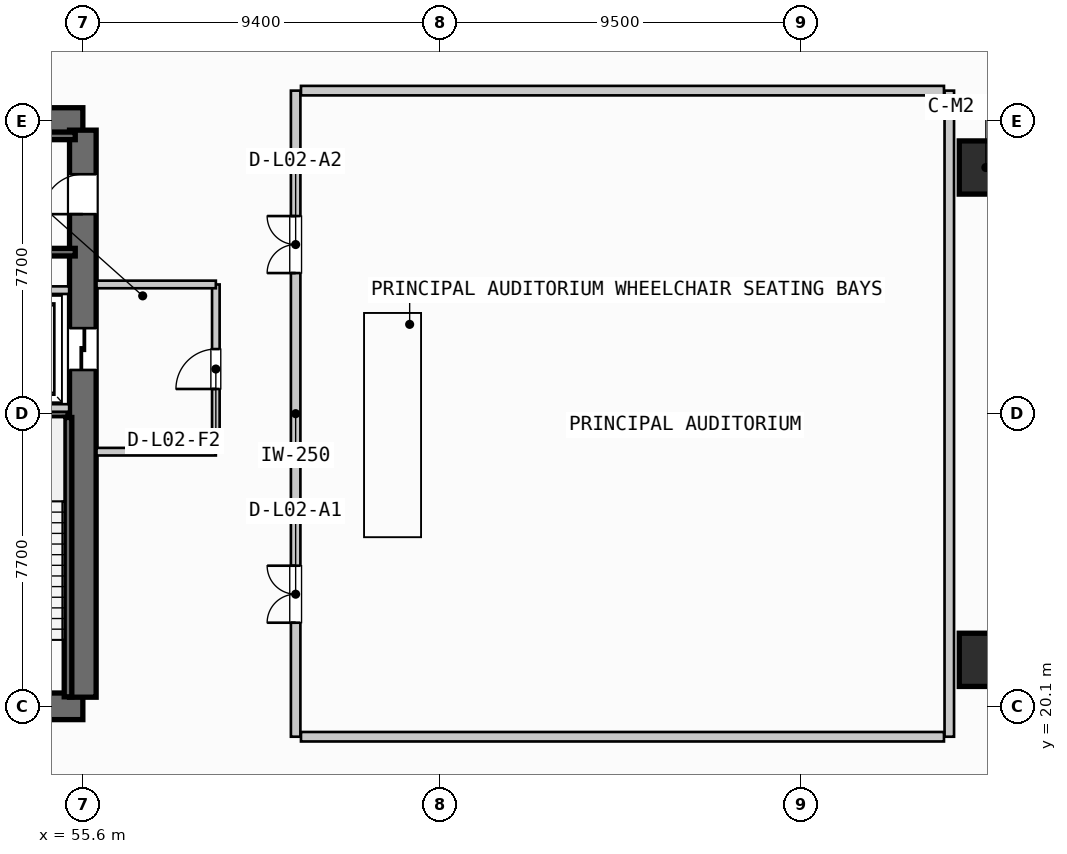
"""IFC4 building model, lengths in metres.
Left out: names, types, materials, properties, quantities, classifications, styles, units other than length and angle.
Written with IfcOpenShell. Run it as: python <this file> out.ifc"""

import sys

from ifc_helpers import new_model, si_unit, direction, frame, frame_2d, origin, origin_2d, place, context, subcontext, project, spatial, rectangle, hollow_rectangle, extrude, source, transform, mapped, element, fill, save


model = new_model("IFC4")
c1 = context("Model", 3, precision=1e-05, world=origin(), true_north=direction((0.0, 1.0)))
c2 = subcontext(c1, "Body", "Model", "MODEL_VIEW")
j1 = project(units=[si_unit("LENGTHUNIT", "METRE"), si_unit("PLANEANGLEUNIT", "RADIAN")], contexts=[c1])
p1 = place(None, origin())
s1 = spatial("IfcSite", under=j1, at=p1, CompositionType="ELEMENT")
p2 = place(p1, origin())
s2 = spatial("IfcBuilding", under=s1, at=p2, CompositionType="ELEMENT")
p3 = place(p2, frame((0.0, 0.0, 10.0)))
s3 = spatial("IfcBuildingStorey", under=s2, at=p3, CompositionType="ELEMENT", Elevation=10.0)
p4 = place(p3, frame((38.0, 20.1, 0.0), z_axis=(0.0, 0.0, 1.0), x_axis=(1.0, 0.0, 0.0)))
e1 = element("IfcWall", 1, at=p4, inside=s3, PredefinedType="SHEAR", context=c2, shape_type="SweptSolid", body=[
    extrude(rectangle(XDim=17.6, YDim=0.7, at=frame_2d((8.8, 0.0))), origin(), (0.0, 0.0, 1.0), 4.53),
])
p5 = place(p4, frame((1.4, 0.0, 0.0)))
e2 = element("IfcOpeningElement", 2, at=p5, cuts=e1, PredefinedType="OPENING", context=c2, shape_type="SweptSolid", body=[
    extrude(rectangle(XDim=1.05, YDim=2.15, at=frame_2d((0.525, 1.075))), frame((0.0, 0.36, 0.0), z_axis=(0.0, -1.0, 0.0), x_axis=(1.0, 0.0, 0.0)), (0.0, 0.0, 1.0), 0.72),
])
p6 = place(p4, frame((15.15, 0.0, 0.0)))
e3 = element("IfcOpeningElement", 3, at=p6, cuts=e1, PredefinedType="OPENING", context=c2, shape_type="SweptSolid", body=[
    extrude(rectangle(XDim=1.05, YDim=2.15, at=frame_2d((0.525, 1.075))), frame((0.0, 0.36, 0.0), z_axis=(0.0, -1.0, 0.0), x_axis=(1.0, 0.0, 0.0)), (0.0, 0.0, 1.0), 0.72),
])
p7 = place(p3, frame((55.6, 35.5, 0.0), z_axis=(0.0, 0.0, 1.0), x_axis=(-1.0, 0.0, 0.0)))
e4 = element("IfcWall", 4, at=p7, inside=s3, PredefinedType="SHEAR", context=c2, shape_type="SweptSolid", body=[
    extrude(rectangle(XDim=17.6, YDim=0.7, at=frame_2d((8.8, 0.0))), origin(), (0.0, 0.0, 1.0), 4.53),
])
p8 = place(p7, frame((8.05, 0.0, 0.0)))
e5 = element("IfcOpeningElement", 5, at=p8, cuts=e4, PredefinedType="OPENING", context=c2, shape_type="SweptSolid", body=[
    extrude(rectangle(XDim=1.5, YDim=2.2, at=frame_2d((0.75, 1.1))), frame((0.0, 0.36, 0.0), z_axis=(0.0, -1.0, 0.0), x_axis=(1.0, 0.0, 0.0)), (0.0, 0.0, 1.0), 0.72),
])
p9 = place(p7, frame((14.95, 0.0, 0.0)))
e6 = element("IfcOpeningElement", 6, at=p9, cuts=e4, PredefinedType="OPENING", context=c2, shape_type="SweptSolid", body=[
    extrude(rectangle(XDim=1.4, YDim=2.3, at=frame_2d((0.7, 1.15))), frame((0.0, 0.36, 0.0), z_axis=(0.0, -1.0, 0.0), x_axis=(1.0, 0.0, 0.0)), (0.0, 0.0, 1.0), 0.72),
])
p10 = place(p7, frame((12.9, 0.0, 0.0)))
e7 = element("IfcOpeningElement", 7, at=p10, cuts=e4, PredefinedType="OPENING", context=c2, shape_type="SweptSolid", body=[
    extrude(rectangle(XDim=0.9, YDim=2.15, at=frame_2d((0.45, 1.075))), frame((0.0, 0.36, 0.0), z_axis=(0.0, -1.0, 0.0), x_axis=(1.0, 0.0, 0.0)), (0.0, 0.0, 1.0), 0.72),
])
p11 = place(p7, frame((10.6, 0.0, 0.0)))
e8 = element("IfcOpeningElement", 8, at=p11, cuts=e4, PredefinedType="OPENING", context=c2, shape_type="SweptSolid", body=[
    extrude(rectangle(XDim=0.95, YDim=2.15, at=frame_2d((0.475, 1.075))), frame((0.0, 0.36, 0.0), z_axis=(0.0, -1.0, 0.0), x_axis=(1.0, 0.0, 0.0)), (0.0, 0.0, 1.0), 0.72),
])
p12 = place(p3, frame((55.6, 20.34, 0.0), z_axis=(0.0, 0.0, 1.0), x_axis=(0.0, 1.0, 0.0)))
e9 = element("IfcWall", 9, at=p12, inside=s3, PredefinedType="SHEAR", context=c2, shape_type="SweptSolid", body=[
    extrude(rectangle(XDim=14.92, YDim=0.7, at=frame_2d((7.46, 0.0))), origin(), (0.0, 0.0, 1.0), 4.53),
])
p13 = place(p12, frame((12.71, 0.0, 0.0)))
e10 = element("IfcOpeningElement", 10, at=p13, cuts=e9, PredefinedType="OPENING", context=c2, shape_type="SweptSolid", body=[
    extrude(rectangle(XDim=1.05, YDim=2.15, at=frame_2d((0.525, 1.075))), frame((0.0, 0.36, 0.0), z_axis=(0.0, -1.0, 0.0), x_axis=(1.0, 0.0, 0.0)), (0.0, 0.0, 1.0), 0.72),
])
p14 = place(p12, frame((8.61, 0.0, 0.0)))
e11 = element("IfcOpeningElement", 11, at=p14, cuts=e9, PredefinedType="OPENING", context=c2, shape_type="SweptSolid", body=[
    extrude(rectangle(XDim=1.1, YDim=2.2, at=frame_2d((0.55, 1.1))), frame((0.0, 0.36, 0.0), z_axis=(0.0, -1.0, 0.0), x_axis=(1.0, 0.0, 0.0)), (0.0, 0.0, 1.0), 0.72),
])
m1 = source(origin(), c2, "Body", "SweptSolid", [
    extrude(hollow_rectangle(XDim=1.4, YDim=1.4, WallThickness=0.05, InnerFilletRadius=0.025, OuterFilletRadius=0.075, at=origin_2d()), origin(), (0.0, 0.0, 1.0), 4.53),
])
for number, where, z_axis, x_axis in (
    (12, (79.362, 34.277, 0.0), (0.0, 0.0, 1.0), (1.0, 0.0, 0.0)),
    (13, (79.362, 21.323, 0.0), (0.0, 0.0, 1.0), (1.0, 0.0, 0.0)),
):
    element("IfcColumn", number, at=place(p3, frame(where, z_axis=z_axis, x_axis=x_axis)), inside=s3, PredefinedType="COLUMN", context=c2, shape_type="MappedRepresentation", body=[
        mapped(m1, transform((0.0, 0.0, 0.0), scale=1.0)),
    ])
p15 = place(p3, frame((52.15, 27.8, 0.0), z_axis=(0.0, 0.0, 1.0), x_axis=(1.0, 0.0, 0.0)))
e14 = element("IfcWall", 14, at=p15, inside=s3, PredefinedType="SHEAR", context=c2, shape_type="SweptSolid", body=[
    extrude(rectangle(XDim=3.06, YDim=0.2, at=frame_2d((1.53, 0.0))), origin(), (0.0, 0.0, 1.0), 4.53),
])
for number, where, z_axis, x_axis in (
    (15, (55.21, 27.7, 0.0), (0.0, 0.0, 1.0), (0.0, -1.0, 0.0)),
    (16, (48.05, 35.11, 0.0), (0.0, 0.0, 1.0), (1.0, 0.0, 0.0)),
    (17, (55.4, 32.05, 0.0), (0.0, 0.0, 1.0), (-1.0, 0.0, 0.0)),
):
    element("IfcWall", number, at=place(p3, frame(where, z_axis=z_axis, x_axis=x_axis)), inside=s3, PredefinedType="SHEAR", context=c2, shape_type="SweptSolid", body=[
        extrude(rectangle(XDim=7.35, YDim=0.2, at=frame_2d((3.675, 0.0))), origin(), (0.0, 0.0, 1.0), 4.53),
    ])
for number, where, z_axis, x_axis in (
    (18, (52.45, 27.95, 0.0), (0.0, 0.0, 1.0), (1.0, 0.0, 0.0)),
    (19, (52.45, 31.05, 0.0), (0.0, 0.0, 1.0), (1.0, 0.0, 0.0)),
):
    element("IfcWall", number, at=place(p3, frame(where, z_axis=z_axis, x_axis=x_axis)), inside=s3, PredefinedType="PARTITIONING", context=c2, shape_type="SweptSolid", body=[
        extrude(rectangle(XDim=2.79, YDim=0.2, at=frame_2d((1.395, 0.0))), origin(), (0.0, 0.0, 1.0), 3.743),
    ])
p16 = place(p3, frame((59.1, 26.8, 0.0), z_axis=(0.0, 0.0, 1.0), x_axis=(0.0, 1.0, 0.0)))
e20 = element("IfcWall", 20, at=p16, inside=s3, PredefinedType="PARTITIONING", context=c2, shape_type="SweptSolid", body=[
    extrude(rectangle(XDim=4.4, YDim=0.2, at=frame_2d((2.2, 0.0))), origin(), (0.0, 0.0, 1.0), 3.743),
])
p17 = place(p16, frame((1.65, 0.0, 0.0)))
e21 = element("IfcOpeningElement", 21, at=p17, cuts=e20, PredefinedType="OPENING", context=c2, shape_type="SweptSolid", body=[
    extrude(rectangle(XDim=1.05, YDim=2.15, at=frame_2d((0.525, 1.075))), frame((0.0, 0.11, 0.0), z_axis=(0.0, -1.0, 0.0), x_axis=(1.0, 0.0, 0.0)), (0.0, 0.0, 1.0), 0.22),
])
for number, where, z_axis, x_axis in (
    (22, (55.96, 26.8, 0.0), (0.0, 0.0, 1.0), (1.0, 0.0, 0.0)),
    (23, (55.96, 31.2, 0.0), (0.0, 0.0, 1.0), (1.0, 0.0, 0.0)),
):
    element("IfcWall", number, at=place(p3, frame(where, z_axis=z_axis, x_axis=x_axis)), inside=s3, PredefinedType="PARTITIONING", context=c2, shape_type="SweptSolid", body=[
        extrude(rectangle(XDim=3.14, YDim=0.2, at=frame_2d((1.57, 0.0))), origin(), (0.0, 0.0, 1.0), 3.743),
    ])
p18 = place(p3, frame((61.2, 19.3, 0.0), z_axis=(0.0, 0.0, 1.0), x_axis=(0.0, 1.0, 0.0)))
e24 = element("IfcWall", 24, at=p18, inside=s3, PredefinedType="SOLIDWALL", context=c2, shape_type="SweptSolid", body=[
    extrude(rectangle(XDim=17.0, YDim=0.25, at=frame_2d((8.5, 0.0))), origin(), (0.0, 0.0, 1.0), 3.743),
])
p19 = place(p18, frame((3.0, 0.0, 0.0)))
e25 = element("IfcOpeningElement", 25, at=p19, cuts=e24, PredefinedType="OPENING", context=c2, shape_type="SweptSolid", body=[
    extrude(rectangle(XDim=1.5, YDim=2.2, at=frame_2d((0.75, 1.1))), frame((0.0, 0.135, 0.0), z_axis=(0.0, -1.0, 0.0), x_axis=(1.0, 0.0, 0.0)), (0.0, 0.0, 1.0), 0.27),
])
p20 = place(p18, frame((12.2, 0.0, 0.0)))
e26 = element("IfcOpeningElement", 26, at=p20, cuts=e24, PredefinedType="OPENING", context=c2, shape_type="SweptSolid", body=[
    extrude(rectangle(XDim=1.5, YDim=2.2, at=frame_2d((0.75, 1.1))), frame((0.0, 0.135, 0.0), z_axis=(0.0, -1.0, 0.0), x_axis=(1.0, 0.0, 0.0)), (0.0, 0.0, 1.0), 0.27),
])
p21 = place(p3, frame((78.4, 19.3, 0.0), z_axis=(0.0, 0.0, 1.0), x_axis=(0.0, 1.0, 0.0)))
e27 = element("IfcWall", 27, at=p21, inside=s3, PredefinedType="SOLIDWALL", context=c2, shape_type="SweptSolid", body=[
    extrude(rectangle(XDim=17.0, YDim=0.25, at=frame_2d((8.5, 0.0))), origin(), (0.0, 0.0, 1.0), 3.743),
])
for number, where, z_axis, x_axis in (
    (28, (61.34, 19.3, 0.0), (0.0, 0.0, 1.0), (1.0, 0.0, 0.0)),
    (29, (61.34, 36.3, 0.0), (0.0, 0.0, 1.0), (1.0, 0.0, 0.0)),
):
    element("IfcWall", number, at=place(p3, frame(where, z_axis=z_axis, x_axis=x_axis)), inside=s3, PredefinedType="SOLIDWALL", context=c2, shape_type="SweptSolid", body=[
        extrude(rectangle(XDim=16.92, YDim=0.25, at=frame_2d((8.46, 0.0))), origin(), (0.0, 0.0, 1.0), 3.743),
    ])
m2 = source(origin(), c2, "Body", "SweptSolid", [
    extrude(rectangle(XDim=1.05, YDim=2.15, at=frame_2d((0.525, 1.075))), frame((0.0, 0.025, 0.0), z_axis=(0.0, -1.0, 0.0), x_axis=(1.0, 0.0, 0.0)), (0.0, 0.0, 1.0), 0.05),
])
p22 = place(p13, origin())
e30 = element("IfcDoor", 30, at=p22, inside=s3, OperationType="SINGLE_SWING_LEFT", PredefinedType="DOOR", context=c2, shape_type="MappedRepresentation", body=[
    mapped(m2, transform((0.0, 0.0, 0.0), scale=1.0)),
])
fill(e10, e30)
m3 = source(origin(), c2, "Body", "SweptSolid", [
    extrude(rectangle(XDim=1.1, YDim=2.2, at=frame_2d((0.55, 1.1))), frame((0.0, 0.025, 0.0), z_axis=(0.0, -1.0, 0.0), x_axis=(1.0, 0.0, 0.0)), (0.0, 0.0, 1.0), 0.05),
])
p23 = place(p14, origin())
e31 = element("IfcDoor", 31, at=p23, inside=s3, OperationType="SLIDING_TO_RIGHT", PredefinedType="DOOR", context=c2, shape_type="MappedRepresentation", body=[
    mapped(m3, transform((0.0, 0.0, 0.0), scale=1.0)),
])
fill(e11, e31)
p24 = place(p17, origin())
e32 = element("IfcDoor", 32, at=p24, inside=s3, OperationType="SINGLE_SWING_LEFT", PredefinedType="DOOR", context=c2, shape_type="MappedRepresentation", body=[
    mapped(m2, transform((0.0, 0.0, 0.0), scale=1.0)),
])
fill(e21, e32)
m4 = source(origin(), c2, "Body", "SweptSolid", [
    extrude(rectangle(XDim=1.5, YDim=2.2, at=frame_2d((0.75, 1.1))), frame((0.0, 0.025, 0.0), z_axis=(0.0, -1.0, 0.0), x_axis=(1.0, 0.0, 0.0)), (0.0, 0.0, 1.0), 0.05),
])
p25 = place(p19, origin())
e33 = element("IfcDoor", 33, at=p25, inside=s3, OperationType="DOUBLE_DOOR_SINGLE_SWING", PredefinedType="DOOR", context=c2, shape_type="MappedRepresentation", body=[
    mapped(m4, transform((0.0, 0.0, 0.0), scale=1.0)),
])
fill(e25, e33)
p26 = place(p20, origin())
e34 = element("IfcDoor", 34, at=p26, inside=s3, OperationType="DOUBLE_DOOR_SINGLE_SWING", PredefinedType="DOOR", context=c2, shape_type="MappedRepresentation", body=[
    mapped(m4, transform((0.0, 0.0, 0.0), scale=1.0)),
])
fill(e26, e34)
save(model, sys.argv[1])
